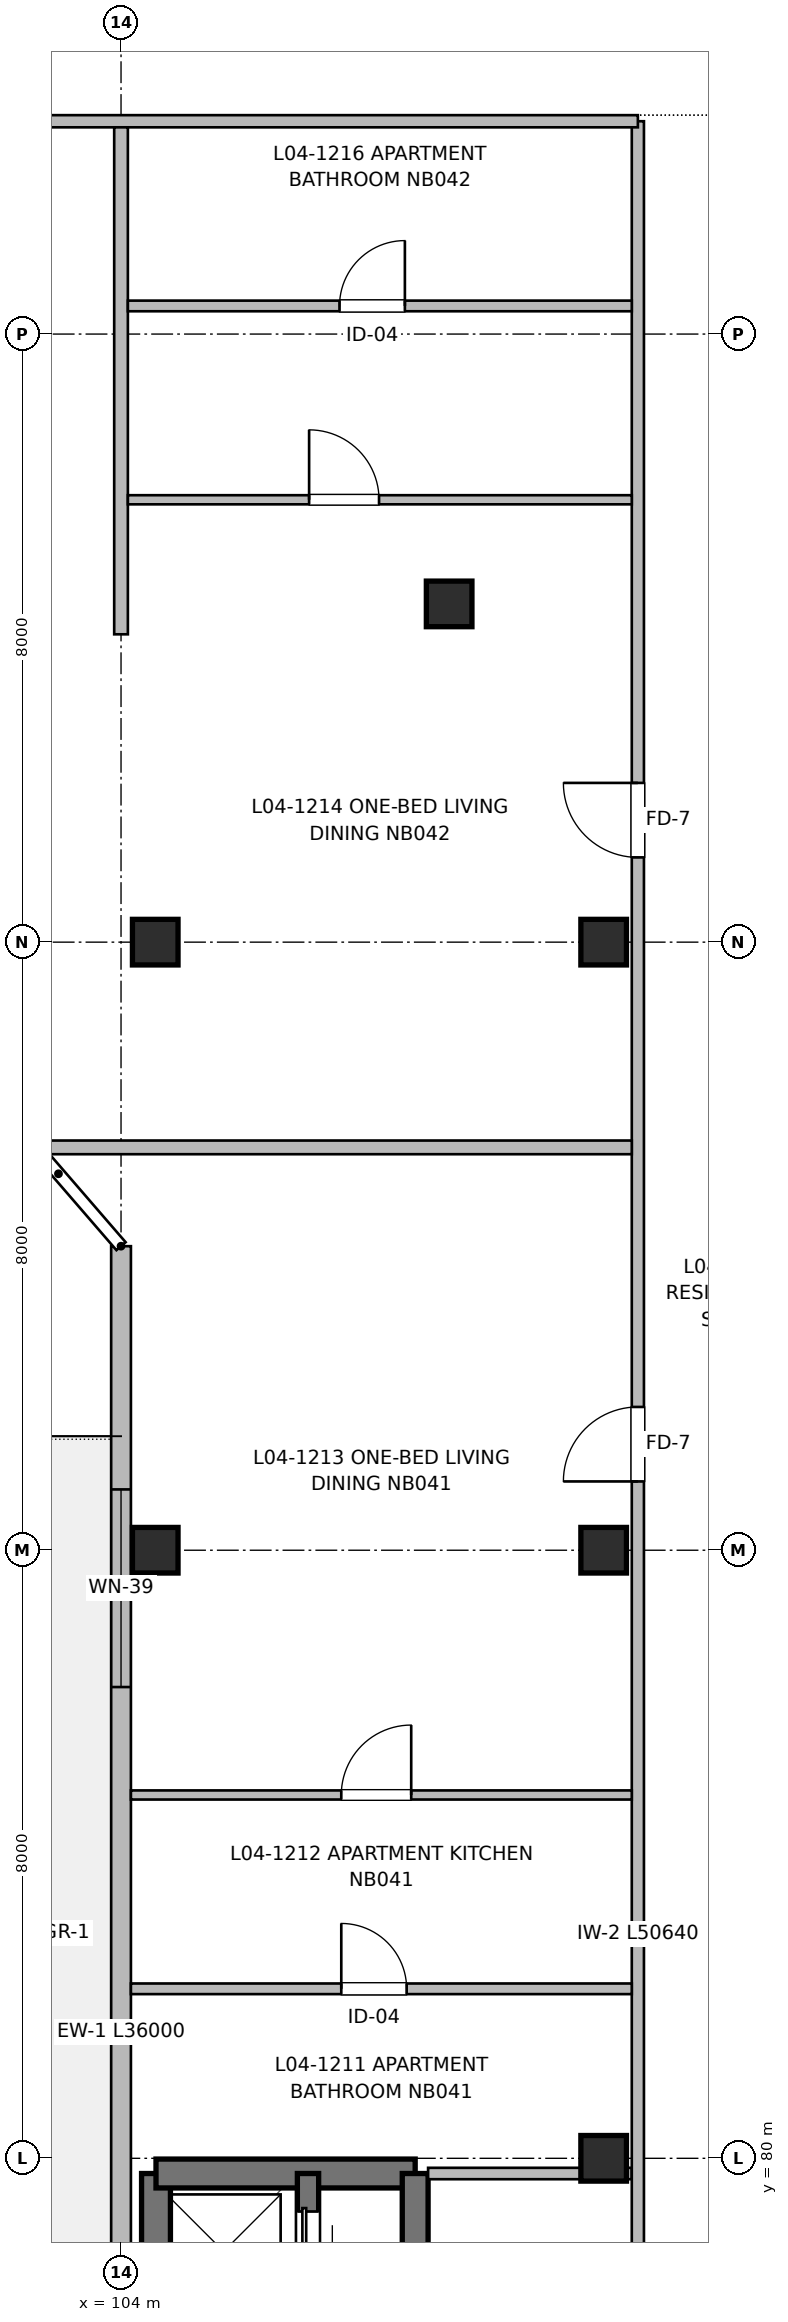
"""IFC4 building model, lengths in metres.
Left out: names, types, materials, properties, quantities, classifications, styles, units other than length and angle.
Written with IfcOpenShell. Run it as: python <this file> out.ifc"""

import sys

from ifc_helpers import new_model, si_unit, direction, frame, frame_2d, origin, origin_2d, place, context, subcontext, project, spatial, rectangle, extrude, element, fill, save


model = new_model("IFC4")
c1 = context("Model", 3, precision=1e-05, world=origin(), true_north=direction((0.0, 1.0)))
c2 = subcontext(c1, "Body", "Model", "MODEL_VIEW")
j1 = project(units=[si_unit("LENGTHUNIT", "METRE"), si_unit("PLANEANGLEUNIT", "RADIAN")], contexts=[c1])
p1 = place(None, origin())
s1 = spatial("IfcSite", under=j1, at=p1, CompositionType="ELEMENT")
p2 = place(p1, origin())
s2 = spatial("IfcBuilding", under=s1, at=p2, CompositionType="ELEMENT")
p3 = place(p2, frame((0.0, 0.0, 13.76)))
s3 = spatial("IfcBuildingStorey", under=s2, at=p3, CompositionType="ELEMENT", Elevation=13.76)
for number, where, z_axis, x_axis in (
    (1, (104.45, 88.0, 0.0), (0.0, 0.0, 1.0), (1.0, 0.0, 0.0)),
    (2, (104.45, 96.0, 0.0), (0.0, 0.0, 1.0), (1.0, 0.0, 0.0)),
    (3, (108.317, 100.45, 0.0), (0.0, 0.0, 1.0), (1.0, 0.0, 0.0)),
    (4, (110.35, 80.0, 0.0), (0.0, 0.0, 1.0), (1.0, 0.0, 0.0)),
    (5, (110.35, 88.0, 0.0), (0.0, 0.0, 1.0), (1.0, 0.0, 0.0)),
    (6, (110.35, 96.0, 0.0), (0.0, 0.0, 1.0), (1.0, 0.0, 0.0)),
):
    element("IfcColumn", number, at=place(p3, frame(where, z_axis=z_axis, x_axis=x_axis)), inside=s3, PredefinedType="COLUMN", context=c2, shape_type="SweptSolid", body=[
        extrude(rectangle(XDim=0.6, YDim=0.6, at=origin_2d()), origin(), (0.0, 0.0, 1.0), 3.2),
    ])
p4 = place(p3, frame((104.46, 67.35, 0.0), z_axis=(0.0, 0.0, 1.0), x_axis=(0.0, 1.0, 0.0)))
e7 = element("IfcWall", 7, at=p4, inside=s3, PredefinedType="SHEAR", context=c2, shape_type="SweptSolid", body=[
    extrude(rectangle(XDim=12.45, YDim=0.38, at=frame_2d((6.225, 0.0))), origin(), (0.0, 0.0, 1.0), 3.2),
])
p5 = place(p4, frame((2.2, 0.0, 0.97)))
e8 = element("IfcOpeningElement", 8, at=p5, cuts=e7, PredefinedType="OPENING", context=c2, shape_type="SweptSolid", body=[
    extrude(rectangle(XDim=0.95, YDim=1.25, at=frame_2d((0.475, 0.625))), frame((0.0, 0.2, 0.0), z_axis=(0.0, -1.0, 0.0), x_axis=(1.0, 0.0, 0.0)), (0.0, 0.0, 1.0), 0.4),
])
p6 = place(p3, frame((104.46, 79.8, 0.0), z_axis=(0.0, 0.0, 1.0), x_axis=(1.0, 0.0, 0.0)))
e9 = element("IfcWall", 9, at=p6, inside=s3, PredefinedType="SHEAR", context=c2, shape_type="SweptSolid", body=[
    extrude(rectangle(XDim=3.41, YDim=0.38, at=frame_2d((1.705, 0.0))), origin(), (0.0, 0.0, 1.0), 3.2),
])
p7 = place(p3, frame((107.87, 79.8, 0.0), z_axis=(0.0, 0.0, 1.0), x_axis=(0.0, -1.0, 0.0)))
e10 = element("IfcWall", 10, at=p7, inside=s3, PredefinedType="SHEAR", context=c2, shape_type="SweptSolid", body=[
    extrude(rectangle(XDim=12.45, YDim=0.34, at=frame_2d((6.225, 0.0))), origin(), (0.0, 0.0, 1.0), 3.2),
])
p8 = place(p7, frame((10.85, 0.0, 0.0)))
e11 = element("IfcOpeningElement", 11, at=p8, cuts=e10, PredefinedType="OPENING", context=c2, shape_type="SweptSolid", body=[
    extrude(rectangle(XDim=1.05, YDim=2.15, at=frame_2d((0.525, 1.075))), frame((0.0, 0.18, 0.0), z_axis=(0.0, -1.0, 0.0), x_axis=(1.0, 0.0, 0.0)), (0.0, 0.0, 1.0), 0.36),
])
p9 = place(p3, frame((106.46, 74.55, 0.0), z_axis=(0.0, 0.0, 1.0), x_axis=(0.0, 1.0, 0.0)))
e12 = element("IfcWall", 12, at=p9, inside=s3, PredefinedType="SHEAR", context=c2, shape_type="SweptSolid", body=[
    extrude(rectangle(XDim=5.25, YDim=0.28, at=frame_2d((2.625, 0.0))), origin(), (0.0, 0.0, 1.0), 3.2),
])
p10 = place(p9, frame((1.15, 0.0, 0.0)))
e13 = element("IfcOpeningElement", 13, at=p10, cuts=e12, PredefinedType="OPENING", context=c2, shape_type="SweptSolid", body=[
    extrude(rectangle(XDim=1.0, YDim=2.15, at=frame_2d((0.5, 1.075))), frame((0.0, 0.15, 0.0), z_axis=(0.0, -1.0, 0.0), x_axis=(1.0, 0.0, 0.0)), (0.0, 0.0, 1.0), 0.3),
])
p11 = place(p9, frame((3.85, 0.0, 0.0)))
e14 = element("IfcOpeningElement", 14, at=p11, cuts=e12, PredefinedType="OPENING", context=c2, shape_type="SweptSolid", body=[
    extrude(rectangle(XDim=0.9, YDim=2.15, at=frame_2d((0.45, 1.075))), frame((0.0, 0.15, 0.0), z_axis=(0.0, -1.0, 0.0), x_axis=(1.0, 0.0, 0.0)), (0.0, 0.0, 1.0), 0.3),
])
p12 = place(p3, frame((104.0, 56.0, 0.0), z_axis=(0.0, 0.0, 1.0), x_axis=(0.0, 1.0, 0.0)))
e15 = element("IfcWall", 15, at=p12, inside=s3, PredefinedType="SOLIDWALL", context=c2, shape_type="SweptSolid", body=[
    extrude(rectangle(XDim=36.0, YDim=0.26, at=frame_2d((18.0, 0.0))), origin(), (0.0, 0.0, 1.0), 2.98),
])
p13 = place(p12, frame((3.9, 0.0, 0.0)))
e16 = element("IfcOpeningElement", 16, at=p13, cuts=e15, PredefinedType="OPENING", context=c2, shape_type="SweptSolid", body=[
    extrude(rectangle(XDim=1.2, YDim=2.2, at=frame_2d((0.6, 1.1))), frame((0.0, 0.14, 0.0), z_axis=(0.0, -1.0, 0.0), x_axis=(1.0, 0.0, 0.0)), (0.0, 0.0, 1.0), 0.28),
])
p14 = place(p12, frame((5.8, 0.0, 0.77)))
e17 = element("IfcOpeningElement", 17, at=p14, cuts=e15, PredefinedType="OPENING", context=c2, shape_type="SweptSolid", body=[
    extrude(rectangle(XDim=1.6, YDim=1.45, at=frame_2d((0.8, 0.725))), frame((0.0, 0.14, 0.0), z_axis=(0.0, -1.0, 0.0), x_axis=(1.0, 0.0, 0.0)), (0.0, 0.0, 1.0), 0.28),
])
p15 = place(p12, frame((12.775, 0.0, 0.77)))
e18 = element("IfcOpeningElement", 18, at=p15, cuts=e15, PredefinedType="OPENING", context=c2, shape_type="SweptSolid", body=[
    extrude(rectangle(XDim=1.45, YDim=1.45, at=frame_2d((0.725, 0.725))), frame((0.0, 0.14, 0.0), z_axis=(0.0, -1.0, 0.0), x_axis=(1.0, 0.0, 0.0)), (0.0, 0.0, 1.0), 0.28),
])
p16 = place(p12, frame((19.175, 0.0, 0.72)))
e19 = element("IfcOpeningElement", 19, at=p16, cuts=e15, PredefinedType="OPENING", context=c2, shape_type="SweptSolid", body=[
    extrude(rectangle(XDim=1.95, YDim=1.5, at=frame_2d((0.975, 0.75))), frame((0.0, 0.14, 0.0), z_axis=(0.0, -1.0, 0.0), x_axis=(1.0, 0.0, 0.0)), (0.0, 0.0, 1.0), 0.28),
])
p17 = place(p12, frame((30.2, 0.0, 0.67)))
e20 = element("IfcOpeningElement", 20, at=p17, cuts=e15, PredefinedType="OPENING", context=c2, shape_type="SweptSolid", body=[
    extrude(rectangle(XDim=2.6, YDim=1.55, at=frame_2d((1.3, 0.775))), frame((0.0, 0.14, 0.0), z_axis=(0.0, -1.0, 0.0), x_axis=(1.0, 0.0, 0.0)), (0.0, 0.0, 1.0), 0.28),
])
p18 = place(p3, frame((108.04, 79.8, 0.0), z_axis=(0.0, 0.0, 1.0), x_axis=(1.0, 0.0, 0.0)))
e21 = element("IfcWall", 21, at=p18, inside=s3, PredefinedType="PARTITIONING", context=c2, shape_type="SweptSolid", body=[
    extrude(rectangle(XDim=2.68, YDim=0.15, at=frame_2d((1.34, 0.0))), origin(), (0.0, 0.0, 1.0), 2.935),
])
p19 = place(p3, frame((110.8, 56.16, 0.0), z_axis=(0.0, 0.0, 1.0), x_axis=(0.0, 1.0, 0.0)))
e22 = element("IfcWall", 22, at=p19, inside=s3, PredefinedType="PARTITIONING", context=c2, shape_type="SweptSolid", body=[
    extrude(rectangle(XDim=50.64, YDim=0.16, at=frame_2d((25.32, 0.0))), origin(), (0.0, 0.0, 1.0), 2.935),
])
p20 = place(p19, frame((12.84, 0.0, 0.0)))
e23 = element("IfcOpeningElement", 23, at=p20, cuts=e22, PredefinedType="OPENING", context=c2, shape_type="SweptSolid", body=[
    extrude(rectangle(XDim=1.1, YDim=2.15, at=frame_2d((0.55, 1.075))), frame((0.0, 0.09, 0.0), z_axis=(0.0, -1.0, 0.0), x_axis=(1.0, 0.0, 0.0)), (0.0, 0.0, 1.0), 0.18),
])
p21 = place(p19, frame((19.24, 0.0, 0.0)))
e24 = element("IfcOpeningElement", 24, at=p21, cuts=e22, PredefinedType="OPENING", context=c2, shape_type="SweptSolid", body=[
    extrude(rectangle(XDim=1.6, YDim=2.15, at=frame_2d((0.8, 1.075))), frame((0.0, 0.09, 0.0), z_axis=(0.0, -1.0, 0.0), x_axis=(1.0, 0.0, 0.0)), (0.0, 0.0, 1.0), 0.18),
])
p22 = place(p19, frame((1.8, 0.0, 0.0)))
e25 = element("IfcOpeningElement", 25, at=p22, cuts=e22, PredefinedType="OPENING", context=c2, shape_type="SweptSolid", body=[
    extrude(rectangle(XDim=0.96, YDim=2.15, at=frame_2d((0.48, 1.075))), frame((0.0, 0.09, 0.0), z_axis=(0.0, -1.0, 0.0), x_axis=(1.0, 0.0, 0.0)), (0.0, 0.0, 1.0), 0.18),
])
p23 = place(p19, frame((32.745, 0.0, 0.0)))
e26 = element("IfcOpeningElement", 26, at=p23, cuts=e22, PredefinedType="OPENING", context=c2, shape_type="SweptSolid", body=[
    extrude(rectangle(XDim=0.98, YDim=2.15, at=frame_2d((0.49, 1.075))), frame((0.0, 0.09, 0.0), z_axis=(0.0, -1.0, 0.0), x_axis=(1.0, 0.0, 0.0)), (0.0, 0.0, 1.0), 0.18),
])
p24 = place(p19, frame((40.955, 0.0, 0.0)))
e27 = element("IfcOpeningElement", 27, at=p24, cuts=e22, PredefinedType="OPENING", context=c2, shape_type="SweptSolid", body=[
    extrude(rectangle(XDim=0.98, YDim=2.15, at=frame_2d((0.49, 1.075))), frame((0.0, 0.09, 0.0), z_axis=(0.0, -1.0, 0.0), x_axis=(1.0, 0.0, 0.0)), (0.0, 0.0, 1.0), 0.18),
])
p25 = place(p3, frame((93.66, 106.8, 0.0), z_axis=(0.0, 0.0, 1.0), x_axis=(1.0, 0.0, 0.0)))
e28 = element("IfcWall", 28, at=p25, inside=s3, PredefinedType="PARTITIONING", context=c2, shape_type="SweptSolid", body=[
    extrude(rectangle(XDim=17.14, YDim=0.16, at=frame_2d((8.57, 0.0))), origin(), (0.0, 0.0, 1.0), 2.935),
])
p26 = place(p3, frame((104.0, 100.05, 0.0), z_axis=(0.0, 0.0, 1.0), x_axis=(0.0, 1.0, 0.0)))
e29 = element("IfcWall", 29, at=p26, inside=s3, PredefinedType="PARTITIONING", context=c2, shape_type="SweptSolid", body=[
    extrude(rectangle(XDim=6.67, YDim=0.18, at=frame_2d((3.335, 0.0))), origin(), (0.0, 0.0, 1.0), 2.935),
])
p27 = place(p3, frame((102.929, 93.3, 0.0), z_axis=(0.0, 0.0, 1.0), x_axis=(1.0, 0.0, 0.0)))
e30 = element("IfcWall", 30, at=p27, inside=s3, PredefinedType="PARTITIONING", context=c2, shape_type="SweptSolid", body=[
    extrude(rectangle(XDim=7.791, YDim=0.18, at=frame_2d((3.895, 0.0))), origin(), (0.0, 0.0, 1.0), 2.935),
])
p28 = place(p3, frame((104.13, 82.23, 0.0), z_axis=(0.0, 0.0, 1.0), x_axis=(1.0, 0.0, 0.0)))
e31 = element("IfcWall", 31, at=p28, inside=s3, PredefinedType="PARTITIONING", context=c2, shape_type="SweptSolid", body=[
    extrude(rectangle(XDim=6.59, YDim=0.14, at=frame_2d((3.295, 0.0))), origin(), (0.0, 0.0, 1.0), 2.935),
])
p29 = place(p28, frame((2.768, 0.0, 0.0)))
e32 = element("IfcOpeningElement", 32, at=p29, cuts=e31, PredefinedType="OPENING", context=c2, shape_type="SweptSolid", body=[
    extrude(rectangle(XDim=0.86, YDim=2.1, at=frame_2d((0.43, 1.05))), frame((0.0, 0.08, 0.0), z_axis=(0.0, -1.0, 0.0), x_axis=(1.0, 0.0, 0.0)), (0.0, 0.0, 1.0), 0.16),
])
p30 = place(p3, frame((104.13, 84.78, 0.0), z_axis=(0.0, 0.0, 1.0), x_axis=(1.0, 0.0, 0.0)))
e33 = element("IfcWall", 33, at=p30, inside=s3, PredefinedType="PARTITIONING", context=c2, shape_type="SweptSolid", body=[
    extrude(rectangle(XDim=6.59, YDim=0.12, at=frame_2d((3.295, 0.0))), origin(), (0.0, 0.0, 1.0), 2.935),
])
p31 = place(p30, frame((2.768, 0.0, 0.0)))
e34 = element("IfcOpeningElement", 34, at=p31, cuts=e33, PredefinedType="OPENING", context=c2, shape_type="SweptSolid", body=[
    extrude(rectangle(XDim=0.92, YDim=2.1, at=frame_2d((0.46, 1.05))), frame((0.0, 0.07, 0.0), z_axis=(0.0, -1.0, 0.0), x_axis=(1.0, 0.0, 0.0)), (0.0, 0.0, 1.0), 0.14),
])
p32 = place(p3, frame((104.09, 101.82, 0.0), z_axis=(0.0, 0.0, 1.0), x_axis=(1.0, 0.0, 0.0)))
e35 = element("IfcWall", 35, at=p32, inside=s3, PredefinedType="PARTITIONING", context=c2, shape_type="SweptSolid", body=[
    extrude(rectangle(XDim=6.63, YDim=0.12, at=frame_2d((3.315, 0.0))), origin(), (0.0, 0.0, 1.0), 2.935),
])
p33 = place(p32, frame((2.385, 0.0, 0.0)))
e36 = element("IfcOpeningElement", 36, at=p33, cuts=e35, PredefinedType="OPENING", context=c2, shape_type="SweptSolid", body=[
    extrude(rectangle(XDim=0.92, YDim=2.1, at=frame_2d((0.46, 1.05))), frame((0.0, 0.07, 0.0), z_axis=(0.0, -1.0, 0.0), x_axis=(1.0, 0.0, 0.0)), (0.0, 0.0, 1.0), 0.14),
])
p34 = place(p3, frame((104.09, 104.37, 0.0), z_axis=(0.0, 0.0, 1.0), x_axis=(1.0, 0.0, 0.0)))
e37 = element("IfcWall", 37, at=p34, inside=s3, PredefinedType="PARTITIONING", context=c2, shape_type="SweptSolid", body=[
    extrude(rectangle(XDim=6.63, YDim=0.14, at=frame_2d((3.315, 0.0))), origin(), (0.0, 0.0, 1.0), 2.935),
])
p35 = place(p34, frame((2.785, 0.0, 0.0)))
e38 = element("IfcOpeningElement", 38, at=p35, cuts=e37, PredefinedType="OPENING", context=c2, shape_type="SweptSolid", body=[
    extrude(rectangle(XDim=0.86, YDim=2.1, at=frame_2d((0.43, 1.05))), frame((0.0, 0.08, 0.0), z_axis=(0.0, -1.0, 0.0), x_axis=(1.0, 0.0, 0.0)), (0.0, 0.0, 1.0), 0.16),
])
p36 = place(p11, origin())
e39 = element("IfcDoor", 39, at=p36, inside=s3, OperationType="SLIDING_TO_RIGHT", PredefinedType="DOOR", context=c2, shape_type="SweptSolid", body=[
    extrude(rectangle(XDim=0.9, YDim=2.15, at=frame_2d((0.45, 1.075))), frame((0.0, 0.025, 0.0), z_axis=(0.0, -1.0, 0.0), x_axis=(1.0, 0.0, 0.0)), (0.0, 0.0, 1.0), 0.05),
])
fill(e14, e39)
p37 = place(p17, origin())
e40 = element("IfcWindow", 40, at=p37, inside=s3, PartitioningType="SINGLE_PANEL", PredefinedType="WINDOW", context=c2, shape_type="SweptSolid", body=[
    extrude(rectangle(XDim=2.6, YDim=1.55, at=frame_2d((1.3, 0.775))), frame((0.0, 0.03, 0.0), z_axis=(0.0, -1.0, 0.0), x_axis=(1.0, 0.0, 0.0)), (0.0, 0.0, 1.0), 0.06),
])
fill(e20, e40)
p38 = place(p29, origin())
e41 = element("IfcDoor", 41, at=p38, inside=s3, OperationType="SINGLE_SWING_LEFT", PredefinedType="DOOR", context=c2, shape_type="SweptSolid", body=[
    extrude(rectangle(XDim=0.86, YDim=2.1, at=frame_2d((0.43, 1.05))), frame((0.0, 0.025, 0.0), z_axis=(0.0, -1.0, 0.0), x_axis=(1.0, 0.0, 0.0)), (0.0, 0.0, 1.0), 0.05),
])
fill(e32, e41)
p39 = place(p31, origin())
e42 = element("IfcDoor", 42, at=p39, inside=s3, OperationType="SINGLE_SWING_RIGHT", PredefinedType="DOOR", context=c2, shape_type="SweptSolid", body=[
    extrude(rectangle(XDim=0.92, YDim=2.1, at=frame_2d((0.46, 1.05))), frame((0.0, 0.025, 0.0), z_axis=(0.0, -1.0, 0.0), x_axis=(1.0, 0.0, 0.0)), (0.0, 0.0, 1.0), 0.05),
])
fill(e34, e42)
p40 = place(p23, origin())
e43 = element("IfcDoor", 43, at=p40, inside=s3, OperationType="SINGLE_SWING_LEFT", PredefinedType="DOOR", context=c2, shape_type="SweptSolid", body=[
    extrude(rectangle(XDim=0.98, YDim=2.15, at=frame_2d((0.49, 1.075))), frame((0.0, 0.025, 0.0), z_axis=(0.0, -1.0, 0.0), x_axis=(1.0, 0.0, 0.0)), (0.0, 0.0, 1.0), 0.05),
])
fill(e26, e43)
p41 = place(p35, origin())
e44 = element("IfcDoor", 44, at=p41, inside=s3, OperationType="SINGLE_SWING_RIGHT", PredefinedType="DOOR", context=c2, shape_type="SweptSolid", body=[
    extrude(rectangle(XDim=0.86, YDim=2.1, at=frame_2d((0.43, 1.05))), frame((0.0, 0.025, 0.0), z_axis=(0.0, -1.0, 0.0), x_axis=(1.0, 0.0, 0.0)), (0.0, 0.0, 1.0), 0.05),
])
fill(e38, e44)
p42 = place(p33, origin())
e45 = element("IfcDoor", 45, at=p42, inside=s3, OperationType="SINGLE_SWING_LEFT", PredefinedType="DOOR", context=c2, shape_type="SweptSolid", body=[
    extrude(rectangle(XDim=0.92, YDim=2.1, at=frame_2d((0.46, 1.05))), frame((0.0, 0.025, 0.0), z_axis=(0.0, -1.0, 0.0), x_axis=(1.0, 0.0, 0.0)), (0.0, 0.0, 1.0), 0.05),
])
fill(e36, e45)
p43 = place(p24, origin())
e46 = element("IfcDoor", 46, at=p43, inside=s3, OperationType="SINGLE_SWING_RIGHT", PredefinedType="DOOR", context=c2, shape_type="SweptSolid", body=[
    extrude(rectangle(XDim=0.98, YDim=2.15, at=frame_2d((0.49, 1.075))), frame((0.0, 0.025, 0.0), z_axis=(0.0, -1.0, 0.0), x_axis=(1.0, 0.0, 0.0)), (0.0, 0.0, 1.0), 0.05),
])
fill(e27, e46)
save(model, sys.argv[1])
